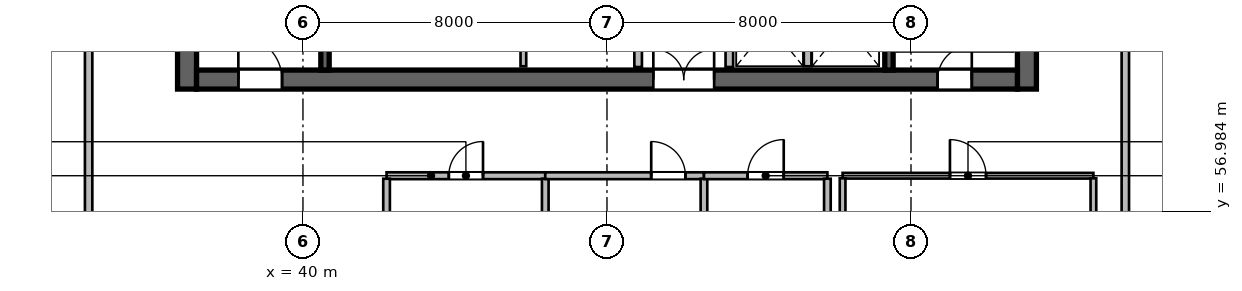
"""IFC4 building model, lengths in metres.
Left out: names, types, materials, properties, quantities, classifications, styles, units other than length and angle.
Written with IfcOpenShell. Run it as: python <this file> out.ifc"""

import sys

from ifc_helpers import new_model, si_unit, direction, frame, frame_2d, origin, place, context, subcontext, project, spatial, rectangle, extrude, source, transform, mapped, element, fill, save


model = new_model("IFC4")
c1 = context("Model", 3, precision=1e-05, world=origin(), true_north=direction((0.0, 1.0)))
c2 = subcontext(c1, "Body", "Model", "MODEL_VIEW")
j1 = project(units=[si_unit("LENGTHUNIT", "METRE"), si_unit("PLANEANGLEUNIT", "RADIAN")], contexts=[c1])
p1 = place(None, origin())
s1 = spatial("IfcSite", under=j1, at=p1, CompositionType="ELEMENT")
p2 = place(p1, origin())
s2 = spatial("IfcBuilding", under=s1, at=p2, CompositionType="ELEMENT")
p3 = place(p2, frame((0.0, 0.0, 115.5)))
s3 = spatial("IfcBuildingStorey", under=s2, at=p3, CompositionType="ELEMENT", Elevation=115.5)
m1 = source(origin(), c2, "Body", "SweptSolid", [
    extrude(rectangle(XDim=12.0, YDim=0.5, at=frame_2d((6.0, 0.0))), origin(), (0.0, 0.0, 1.0), 3.9),
])
for number, where, z_axis, x_axis in (
    (1, (36.95, 60.2, 0.0), (0.0, 0.0, 1.0), (0.0, 1.0, 0.0)),
    (2, (59.05, 60.2, 0.0), (0.0, 0.0, 1.0), (0.0, 1.0, 0.0)),
):
    element("IfcWall", number, at=place(p3, frame(where, z_axis=z_axis, x_axis=x_axis)), inside=s3, PredefinedType="SHEAR", context=c2, shape_type="MappedRepresentation", body=[
        mapped(m1, transform((0.0, 0.0, 0.0), scale=1.0)),
    ])
m2 = source(origin(), c2, "Body", "SweptSolid", [
    extrude(rectangle(XDim=21.6, YDim=0.5, at=frame_2d((10.8, 0.0))), origin(), (0.0, 0.0, 1.0), 3.9),
])
p4 = place(p3, frame((37.2, 60.45, 0.0), z_axis=(0.0, 0.0, 1.0), x_axis=(1.0, 0.0, 0.0)))
e3 = element("IfcWall", 3, at=p4, inside=s3, PredefinedType="SHEAR", context=c2, shape_type="MappedRepresentation", body=[
    mapped(m2, transform((0.0, 0.0, 0.0), scale=1.0)),
])
p5 = place(p4, frame((1.1, 0.0, 0.0)))
e4 = element("IfcOpeningElement", 4, at=p5, cuts=e3, PredefinedType="OPENING", context=c2, shape_type="SweptSolid", body=[
    extrude(rectangle(XDim=1.15, YDim=2.15, at=frame_2d((0.575, 1.075))), frame((0.0, 0.26, 0.0), z_axis=(0.0, -1.0, 0.0), x_axis=(1.0, 0.0, 0.0)), (0.0, 0.0, 1.0), 0.52),
])
p6 = place(p4, frame((19.5, 0.0, 0.0)))
e5 = element("IfcOpeningElement", 5, at=p6, cuts=e3, PredefinedType="OPENING", context=c2, shape_type="SweptSolid", body=[
    extrude(rectangle(XDim=0.9, YDim=2.1, at=frame_2d((0.45, 1.05))), frame((0.0, 0.26, 0.0), z_axis=(0.0, -1.0, 0.0), x_axis=(1.0, 0.0, 0.0)), (0.0, 0.0, 1.0), 0.52),
])
p7 = place(p4, frame((12.02, 0.0, 0.0)))
e6 = element("IfcOpeningElement", 6, at=p7, cuts=e3, PredefinedType="OPENING", context=c2, shape_type="SweptSolid", body=[
    extrude(rectangle(XDim=1.6, YDim=2.15, at=frame_2d((0.8, 1.075))), frame((0.0, 0.26, 0.0), z_axis=(0.0, -1.0, 0.0), x_axis=(1.0, 0.0, 0.0)), (0.0, 0.0, 1.0), 0.52),
])
m3 = source(origin(), c2, "Body", "SweptSolid", [
    extrude(rectangle(XDim=11.0, YDim=0.22, at=frame_2d((5.5, 0.0))), origin(), (0.0, 0.0, 1.0), 3.9),
])
p8 = place(p3, frame((40.58, 60.7, 0.0), z_axis=(0.0, 0.0, 1.0), x_axis=(0.0, 1.0, 0.0)))
e7 = element("IfcWall", 7, at=p8, inside=s3, PredefinedType="SHEAR", context=c2, shape_type="MappedRepresentation", body=[
    mapped(m3, transform((0.0, 0.0, 0.0), scale=1.0)),
])
p9 = place(p3, frame((55.42, 60.7, 0.0), z_axis=(0.0, 0.0, 1.0), x_axis=(0.0, 1.0, 0.0)))
e8 = element("IfcWall", 8, at=p9, inside=s3, PredefinedType="SHEAR", context=c2, shape_type="MappedRepresentation", body=[
    mapped(m3, transform((0.0, 0.0, 0.0), scale=1.0)),
])
p10 = place(p9, frame((9.545, 0.0, 0.0)))
e9 = element("IfcOpeningElement", 9, at=p10, cuts=e8, PredefinedType="OPENING", context=c2, shape_type="SweptSolid", body=[
    extrude(rectangle(XDim=1.15, YDim=2.15, at=frame_2d((0.575, 1.075))), frame((0.0, 0.12, 0.0), z_axis=(0.0, -1.0, 0.0), x_axis=(1.0, 0.0, 0.0)), (0.0, 0.0, 1.0), 0.24),
])
m4 = source(origin(), c2, "Body", "SweptSolid", [
    extrude(rectangle(XDim=2.24, YDim=0.2, at=frame_2d((1.12, 0.0))), origin(), (0.0, 0.0, 1.0), 3.65),
])
for number, where, z_axis, x_axis in (
    (10, (48.82, 60.78, 0.0), (0.0, 0.0, 1.0), (0.0, 1.0, 0.0)),
    (11, (51.22, 60.78, 0.0), (0.0, 0.0, 1.0), (0.0, 1.0, 0.0)),
):
    element("IfcWall", number, at=place(p3, frame(where, z_axis=z_axis, x_axis=x_axis)), inside=s3, PredefinedType="SOLIDWALL", context=c2, shape_type="MappedRepresentation", body=[
        mapped(m4, transform((0.0, 0.0, 0.0), scale=1.0)),
    ])
m5 = source(origin(), c2, "Body", "SweptSolid", [
    extrude(rectangle(XDim=2.2, YDim=0.15, at=frame_2d((1.1, 0.0))), origin(), (0.0, 0.0, 1.0), 3.65),
])
p11 = place(p3, frame((45.8, 60.8, 0.0), z_axis=(0.0, 0.0, 1.0), x_axis=(0.0, 1.0, 0.0)))
e12 = element("IfcWall", 12, at=p11, inside=s3, PredefinedType="PARTITIONING", context=c2, shape_type="MappedRepresentation", body=[
    mapped(m5, transform((0.0, 0.0, 0.0), scale=1.0)),
])
m6 = source(origin(), c2, "Body", "SweptSolid", [
    extrude(rectangle(XDim=2.2, YDim=0.2, at=frame_2d((1.1, 0.0))), origin(), (0.0, 0.0, 1.0), 3.65),
])
p12 = place(p3, frame((53.28, 60.8, 0.0), z_axis=(0.0, 0.0, 1.0), x_axis=(0.0, 1.0, 0.0)))
e13 = element("IfcWall", 13, at=p12, inside=s3, PredefinedType="SOLIDWALL", context=c2, shape_type="MappedRepresentation", body=[
    mapped(m6, transform((0.0, 0.0, 0.0), scale=1.0)),
])
m7 = source(origin(), c2, "Body", "SweptSolid", [
    extrude(rectangle(XDim=4.176, YDim=0.18, at=frame_2d((2.088, 0.0))), origin(), (0.0, 0.0, 1.0), 3.65),
])
p13 = place(p3, frame((42.2, 57.92, 0.0), z_axis=(0.0, 0.0, 1.0), x_axis=(1.0, 0.0, 0.0)))
e14 = element("IfcWall", 14, at=p13, inside=s3, PredefinedType="PLUMBINGWALL", context=c2, shape_type="MappedRepresentation", body=[
    mapped(m7, transform((0.0, 0.0, 0.0), scale=1.0)),
])
p14 = place(p13, frame((1.638, 0.0, 0.0)))
e15 = element("IfcOpeningElement", 15, at=p14, cuts=e14, PredefinedType="OPENING", context=c2, shape_type="SweptSolid", body=[
    extrude(rectangle(XDim=0.9, YDim=2.08, at=frame_2d((0.45, 1.04))), frame((0.0, 0.1, 0.0), z_axis=(0.0, -1.0, 0.0), x_axis=(1.0, 0.0, 0.0)), (0.0, 0.0, 1.0), 0.2),
])
m8 = source(origin(), c2, "Body", "SweptSolid", [
    extrude(rectangle(XDim=3.763, YDim=0.175, at=frame_2d((1.881, 0.0))), origin(), (0.0, 0.0, 1.0), 3.65),
])
for number, where, z_axis, x_axis in (
    (16, (42.2, 54.079, 0.0), (0.0, 0.0, 1.0), (0.0, 1.0, 0.0)),
    (17, (46.376, 54.079, 0.0), (0.0, 0.0, 1.0), (0.0, 1.0, 0.0)),
):
    element("IfcWall", number, at=place(p3, frame(where, z_axis=z_axis, x_axis=x_axis)), inside=s3, PredefinedType="PARTITIONING", context=c2, shape_type="MappedRepresentation", body=[
        mapped(m8, transform((0.0, 0.0, 0.0), scale=1.0)),
    ])
p15 = place(p3, frame((46.376, 57.92, 0.0), z_axis=(0.0, 0.0, 1.0), x_axis=(1.0, 0.0, 0.0)))
e18 = element("IfcWall", 18, at=p15, inside=s3, PredefinedType="PLUMBINGWALL", context=c2, shape_type="MappedRepresentation", body=[
    mapped(m7, transform((0.0, 0.0, 0.0), scale=1.0)),
])
p16 = place(p15, frame((2.788, 0.0, 0.0)))
e19 = element("IfcOpeningElement", 19, at=p16, cuts=e18, PredefinedType="OPENING", context=c2, shape_type="SweptSolid", body=[
    extrude(rectangle(XDim=0.9, YDim=2.08, at=frame_2d((0.45, 1.04))), frame((0.0, 0.1, 0.0), z_axis=(0.0, -1.0, 0.0), x_axis=(1.0, 0.0, 0.0)), (0.0, 0.0, 1.0), 0.2),
])
p17 = place(p3, frame((50.552, 54.079, 0.0), z_axis=(0.0, 0.0, 1.0), x_axis=(0.0, 1.0, 0.0)))
e20 = element("IfcWall", 20, at=p17, inside=s3, PredefinedType="PARTITIONING", context=c2, shape_type="MappedRepresentation", body=[
    mapped(m8, transform((0.0, 0.0, 0.0), scale=1.0)),
])
m9 = source(origin(), c2, "Body", "SweptSolid", [
    extrude(rectangle(XDim=3.248, YDim=0.18, at=frame_2d((1.624, 0.0))), origin(), (0.0, 0.0, 1.0), 3.65),
])
p18 = place(p3, frame((50.552, 57.92, 0.0), z_axis=(0.0, 0.0, 1.0), x_axis=(1.0, 0.0, 0.0)))
e21 = element("IfcWall", 21, at=p18, inside=s3, PredefinedType="PLUMBINGWALL", context=c2, shape_type="MappedRepresentation", body=[
    mapped(m9, transform((0.0, 0.0, 0.0), scale=1.0)),
])
p19 = place(p18, frame((1.149, 0.0, 0.0)))
e22 = element("IfcOpeningElement", 22, at=p19, cuts=e21, PredefinedType="OPENING", context=c2, shape_type="SweptSolid", body=[
    extrude(rectangle(XDim=0.95, YDim=2.12, at=frame_2d((0.475, 1.06))), frame((0.0, 0.1, 0.0), z_axis=(0.0, -1.0, 0.0), x_axis=(1.0, 0.0, 0.0)), (0.0, 0.0, 1.0), 0.2),
])
p20 = place(p3, frame((53.8, 54.079, 0.0), z_axis=(0.0, 0.0, 1.0), x_axis=(0.0, 1.0, 0.0)))
e23 = element("IfcWall", 23, at=p20, inside=s3, PredefinedType="PARTITIONING", context=c2, shape_type="MappedRepresentation", body=[
    mapped(m8, transform((0.0, 0.0, 0.0), scale=1.0)),
])
m10 = source(origin(), c2, "Body", "SweptSolid", [
    extrude(rectangle(XDim=6.6, YDim=0.15, at=frame_2d((3.3, 0.0))), origin(), (0.0, 0.0, 1.0), 3.65),
])
p21 = place(p3, frame((54.2, 57.92, 0.0), z_axis=(0.0, 0.0, 1.0), x_axis=(1.0, 0.0, 0.0)))
e24 = element("IfcWall", 24, at=p21, inside=s3, PredefinedType="PARTITIONING", context=c2, shape_type="MappedRepresentation", body=[
    mapped(m10, transform((0.0, 0.0, 0.0), scale=1.0)),
])
p22 = place(p21, frame((2.825, 0.0, 0.0)))
e25 = element("IfcOpeningElement", 25, at=p22, cuts=e24, PredefinedType="OPENING", context=c2, shape_type="SweptSolid", body=[
    extrude(rectangle(XDim=0.95, YDim=2.1, at=frame_2d((0.475, 1.05))), frame((0.0, 0.085, 0.0), z_axis=(0.0, -1.0, 0.0), x_axis=(1.0, 0.0, 0.0)), (0.0, 0.0, 1.0), 0.17),
])
m11 = source(origin(), c2, "Body", "SweptSolid", [
    extrude(rectangle(XDim=3.785, YDim=0.15, at=frame_2d((1.893, 0.0))), origin(), (0.0, 0.0, 1.0), 3.65),
])
for number, where, z_axis, x_axis in (
    (26, (54.2, 54.067, 0.0), (0.0, 0.0, 1.0), (0.0, 1.0, 0.0)),
    (27, (60.8, 54.067, 0.0), (0.0, 0.0, 1.0), (0.0, 1.0, 0.0)),
):
    element("IfcWall", number, at=place(p3, frame(where, z_axis=z_axis, x_axis=x_axis)), inside=s3, PredefinedType="PARTITIONING", context=c2, shape_type="MappedRepresentation", body=[
        mapped(m11, transform((0.0, 0.0, 0.0), scale=1.0)),
    ])
m12 = source(origin(), c2, "Body", "SweptSolid", [
    extrude(rectangle(XDim=13.988, YDim=0.195, at=frame_2d((6.994, 0.0))), origin(), (0.0, 0.0, 1.0), 3.65),
])
p23 = place(p3, frame((34.36, 47.472, 0.0), z_axis=(0.0, 0.0, 1.0), x_axis=(0.0, 1.0, 0.0)))
e28 = element("IfcWall", 28, at=p23, inside=s3, PredefinedType="PARTITIONING", context=c2, shape_type="MappedRepresentation", body=[
    mapped(m12, transform((0.0, 0.0, 0.0), scale=1.0)),
])
m13 = source(origin(), c2, "Body", "SweptSolid", [
    extrude(rectangle(XDim=13.988, YDim=0.195, at=frame_2d((6.994, 0.0))), origin(), (0.0, 0.0, 1.0), 2.942),
])
p24 = place(p3, frame((61.64, 47.472, 0.0), z_axis=(0.0, 0.0, 1.0), x_axis=(0.0, 1.0, 0.0)))
e29 = element("IfcWall", 29, at=p24, inside=s3, PredefinedType="PARTITIONING", context=c2, shape_type="MappedRepresentation", body=[
    mapped(m13, transform((0.0, 0.0, 0.0), scale=1.0)),
])
m14 = source(origin(), c2, "Body", "SweptSolid", [
    extrude(rectangle(XDim=1.15, YDim=2.15, at=frame_2d((0.575, 1.075))), frame((0.0, 0.025, 0.0), z_axis=(0.0, -1.0, 0.0), x_axis=(1.0, 0.0, 0.0)), (0.0, 0.0, 1.0), 0.05),
])
p25 = place(p5, origin())
e30 = element("IfcDoor", 30, at=p25, inside=s3, OperationType="SINGLE_SWING_LEFT", PredefinedType="DOOR", context=c2, shape_type="MappedRepresentation", body=[
    mapped(m14, transform((0.0, 0.0, 0.0), scale=1.0)),
])
fill(e4, e30)
m15 = source(origin(), c2, "Body", "SweptSolid", [
    extrude(rectangle(XDim=0.9, YDim=2.1, at=frame_2d((0.45, 1.05))), frame((0.0, 0.025, 0.0), z_axis=(0.0, -1.0, 0.0), x_axis=(1.0, 0.0, 0.0)), (0.0, 0.0, 1.0), 0.05),
])
p26 = place(p6, origin())
e31 = element("IfcDoor", 31, at=p26, inside=s3, OperationType="SINGLE_SWING_RIGHT", PredefinedType="DOOR", context=c2, shape_type="MappedRepresentation", body=[
    mapped(m15, transform((0.0, 0.0, 0.0), scale=1.0)),
])
fill(e5, e31)
m16 = source(origin(), c2, "Body", "SweptSolid", [
    extrude(rectangle(XDim=1.6, YDim=2.15, at=frame_2d((0.8, 1.075))), frame((0.0, 0.025, 0.0), z_axis=(0.0, -1.0, 0.0), x_axis=(1.0, 0.0, 0.0)), (0.0, 0.0, 1.0), 0.05),
])
p27 = place(p7, origin())
e32 = element("IfcDoor", 32, at=p27, inside=s3, OperationType="DOUBLE_DOOR_SINGLE_SWING", PredefinedType="DOOR", context=c2, shape_type="MappedRepresentation", body=[
    mapped(m16, transform((0.0, 0.0, 0.0), scale=1.0)),
])
fill(e6, e32)
m17 = source(origin(), c2, "Body", "SweptSolid", [
    extrude(rectangle(XDim=0.9, YDim=2.08, at=frame_2d((0.45, 1.04))), frame((0.0, 0.025, 0.0), z_axis=(0.0, -1.0, 0.0), x_axis=(1.0, 0.0, 0.0)), (0.0, 0.0, 1.0), 0.05),
])
p28 = place(p14, origin())
e33 = element("IfcDoor", 33, at=p28, inside=s3, OperationType="SINGLE_SWING_RIGHT", PredefinedType="DOOR", context=c2, shape_type="MappedRepresentation", body=[
    mapped(m17, transform((0.0, 0.0, 0.0), scale=1.0)),
])
fill(e15, e33)
p29 = place(p16, origin())
e34 = element("IfcDoor", 34, at=p29, inside=s3, OperationType="SINGLE_SWING_LEFT", PredefinedType="DOOR", context=c2, shape_type="MappedRepresentation", body=[
    mapped(m17, transform((0.0, 0.0, 0.0), scale=1.0)),
])
fill(e19, e34)
m18 = source(origin(), c2, "Body", "SweptSolid", [
    extrude(rectangle(XDim=0.95, YDim=2.12, at=frame_2d((0.475, 1.06))), frame((0.0, 0.025, 0.0), z_axis=(0.0, -1.0, 0.0), x_axis=(1.0, 0.0, 0.0)), (0.0, 0.0, 1.0), 0.05),
])
p30 = place(p19, origin())
e35 = element("IfcDoor", 35, at=p30, inside=s3, OperationType="SINGLE_SWING_RIGHT", PredefinedType="DOOR", context=c2, shape_type="MappedRepresentation", body=[
    mapped(m18, transform((0.0, 0.0, 0.0), scale=1.0)),
])
fill(e22, e35)
m19 = source(origin(), c2, "Body", "SweptSolid", [
    extrude(rectangle(XDim=0.95, YDim=2.1, at=frame_2d((0.475, 1.05))), frame((0.0, 0.025, 0.0), z_axis=(0.0, -1.0, 0.0), x_axis=(1.0, 0.0, 0.0)), (0.0, 0.0, 1.0), 0.05),
])
p31 = place(p22, origin())
e36 = element("IfcDoor", 36, at=p31, inside=s3, OperationType="SINGLE_SWING_LEFT", PredefinedType="DOOR", context=c2, shape_type="MappedRepresentation", body=[
    mapped(m19, transform((0.0, 0.0, 0.0), scale=1.0)),
])
fill(e25, e36)
save(model, sys.argv[1])
